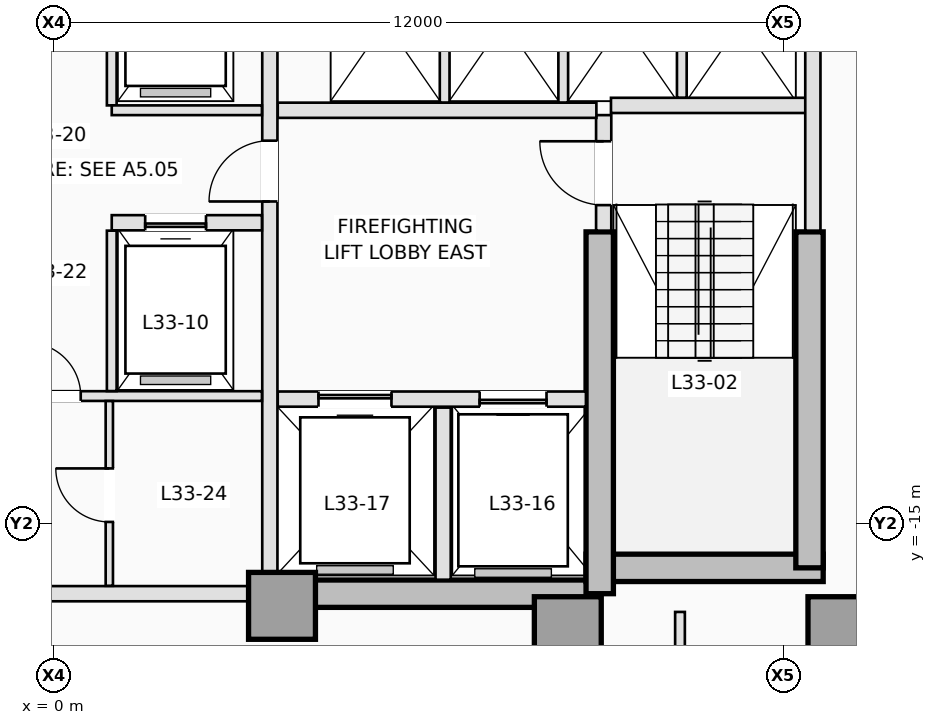
"""IFC4 building model, lengths in metres.
Left out: names, types, materials, properties, quantities, classifications, styles, units other than length and angle.
Written with IfcOpenShell. Run it as: python <this file> out.ifc"""

import sys

from ifc_helpers import new_model, si_unit, direction, frame, frame_2d, origin, origin_2d, place, context, subcontext, project, spatial, rectangle, extrude, element, fill, save


model = new_model("IFC4")
c1 = context("Model", 3, precision=1e-05, world=origin(), true_north=direction((0.0, 1.0)))
c2 = subcontext(c1, "Body", "Model", "MODEL_VIEW")
j1 = project(units=[si_unit("LENGTHUNIT", "METRE"), si_unit("PLANEANGLEUNIT", "RADIAN")], contexts=[c1])
p1 = place(None, origin())
s1 = spatial("IfcSite", under=j1, at=p1, CompositionType="ELEMENT")
p2 = place(p1, origin())
s2 = spatial("IfcBuilding", under=s1, at=p2, CompositionType="ELEMENT")
p3 = place(p2, frame((0.0, 0.0, 123.0)))
s3 = spatial("IfcBuildingStorey", under=s2, at=p3, CompositionType="ELEMENT", Elevation=123.0)
p4 = place(p3, frame((3.75, -16.15, 0.0), z_axis=(0.0, 0.0, 1.0), x_axis=(1.0, 0.0, 0.0)))
e1 = element("IfcWall", 1, at=p4, inside=s3, PredefinedType="SHEAR", context=c2, shape_type="SweptSolid", body=[
    extrude(rectangle(XDim=5.225, YDim=0.45, at=frame_2d((2.613, 0.0))), origin(), (0.0, 0.0, 1.0), 3.5),
])
p5 = place(p3, frame((8.75, -15.725, 0.0), z_axis=(0.0, 0.0, 1.0), x_axis=(1.0, 0.0, 0.0)))
e2 = element("IfcWall", 2, at=p5, inside=s3, PredefinedType="SHEAR", context=c2, shape_type="SweptSolid", body=[
    extrude(rectangle(XDim=3.9, YDim=0.45, at=frame_2d((1.95, 0.0))), origin(), (0.0, 0.0, 1.0), 3.5),
])
p6 = place(p3, frame((12.425, -15.725, 0.0), z_axis=(0.0, 0.0, 1.0), x_axis=(0.0, 1.0, 0.0)))
e3 = element("IfcWall", 3, at=p6, inside=s3, PredefinedType="SHEAR", context=c2, shape_type="SweptSolid", body=[
    extrude(rectangle(XDim=5.525, YDim=0.45, at=frame_2d((2.763, 0.0))), origin(), (0.0, 0.0, 1.0), 3.5),
])
p7 = place(p3, frame((8.975, -16.15, 0.0), z_axis=(0.0, 0.0, 1.0), x_axis=(0.0, 1.0, 0.0)))
e4 = element("IfcWall", 4, at=p7, inside=s3, PredefinedType="SHEAR", context=c2, shape_type="SweptSolid", body=[
    extrude(rectangle(XDim=5.95, YDim=0.45, at=frame_2d((2.975, 0.0))), origin(), (0.0, 0.0, 1.0), 3.5),
])
for number, where, z_axis, x_axis in (
    (5, (3.75, -16.35, 0.0), (0.0, 0.0, 1.0), (1.0, 0.0, 0.0)),
    (6, (8.45, -16.75, 0.0), (0.0, 0.0, 1.0), (1.0, 0.0, 0.0)),
    (7, (12.95, -16.75, 0.0), (0.0, 0.0, 1.0), (1.0, 0.0, 0.0)),
):
    element("IfcColumn", number, at=place(p3, frame(where, z_axis=z_axis, x_axis=x_axis)), inside=s3, PredefinedType="COLUMN", context=c2, shape_type="SweptSolid", body=[
        extrude(rectangle(XDim=1.1, YDim=1.1, at=origin_2d()), origin(), (0.0, 0.0, 1.0), 3.5),
    ])
p8 = place(p3, frame((9.04, -10.18, 0.0), z_axis=(0.0, 0.0, 1.0), x_axis=(0.0, 1.0, 0.0)))
e8 = element("IfcWall", 8, at=p8, inside=s3, PredefinedType="PARTITIONING", context=c2, shape_type="SweptSolid", body=[
    extrude(rectangle(XDim=1.9, YDim=0.25, at=frame_2d((0.95, 0.0))), origin(), (0.0, 0.0, 1.0), 3.25),
])
p9 = place(p8, frame((0.42, 0.0, 0.0)))
e9 = element("IfcOpeningElement", 9, at=p9, cuts=e8, PredefinedType="OPENING", context=c2, shape_type="SweptSolid", body=[
    extrude(rectangle(XDim=1.05, YDim=2.15, at=frame_2d((0.525, 1.075))), frame((0.0, 0.135, 0.0), z_axis=(0.0, -1.0, 0.0), x_axis=(1.0, 0.0, 0.0)), (0.0, 0.0, 1.0), 0.27),
])
p10 = place(p3, frame((9.16, -8.12, 0.0), z_axis=(0.0, 0.0, 1.0), x_axis=(1.0, 0.0, 0.0)))
e10 = element("IfcWall", 10, at=p10, inside=s3, PredefinedType="PARTITIONING", context=c2, shape_type="SweptSolid", body=[
    extrude(rectangle(XDim=3.22, YDim=0.25, at=frame_2d((1.61, 0.0))), origin(), (0.0, 0.0, 1.0), 3.25),
])
p11 = place(p3, frame((12.48, -10.18, 0.0), z_axis=(0.0, 0.0, 1.0), x_axis=(0.0, 1.0, 0.0)))
e11 = element("IfcWall", 11, at=p11, inside=s3, PredefinedType="PARTITIONING", context=c2, shape_type="SweptSolid", body=[
    extrude(rectangle(XDim=4.828, YDim=0.25, at=frame_2d((2.414, 0.0))), origin(), (0.0, 0.0, 1.0), 3.25),
])
p12 = place(p3, frame((3.68, -12.95, 0.0), z_axis=(0.0, 0.0, 1.0), x_axis=(1.0, 0.0, 0.0)))
e12 = element("IfcWall", 12, at=p12, inside=s3, PredefinedType="PARTITIONING", context=c2, shape_type="SweptSolid", body=[
    extrude(rectangle(XDim=5.068, YDim=0.25, at=frame_2d((2.534, 0.0))), origin(), (0.0, 0.0, 1.0), 3.25),
])
p13 = place(p12, frame((3.32, 0.0, 0.0)))
e13 = element("IfcOpeningElement", 13, at=p13, cuts=e12, PredefinedType="OPENING", context=c2, shape_type="SweptSolid", body=[
    extrude(rectangle(XDim=1.1, YDim=2.15, at=frame_2d((0.55, 1.075))), frame((0.0, 0.135, 0.0), z_axis=(0.0, -1.0, 0.0), x_axis=(1.0, 0.0, 0.0)), (0.0, 0.0, 1.0), 0.27),
])
p14 = place(p12, frame((0.67, 0.0, 0.0)))
e14 = element("IfcOpeningElement", 14, at=p14, cuts=e12, PredefinedType="OPENING", context=c2, shape_type="SweptSolid", body=[
    extrude(rectangle(XDim=1.2, YDim=2.15, at=frame_2d((0.6, 1.075))), frame((0.0, 0.135, 0.0), z_axis=(0.0, -1.0, 0.0), x_axis=(1.0, 0.0, 0.0)), (0.0, 0.0, 1.0), 0.27),
])
p15 = place(p3, frame((6.4, -15.92, 0.0), z_axis=(0.0, 0.0, 1.0), x_axis=(0.0, 1.0, 0.0)))
e15 = element("IfcWall", 15, at=p15, inside=s3, PredefinedType="PARTITIONING", context=c2, shape_type="SweptSolid", body=[
    extrude(rectangle(XDim=2.83, YDim=0.25, at=frame_2d((1.415, 0.0))), origin(), (0.0, 0.0, 1.0), 3.25),
])
p16 = place(p3, frame((3.68, -8.2, 0.0), z_axis=(0.0, 0.0, 1.0), x_axis=(1.0, 0.0, 0.0)))
e16 = element("IfcWall", 16, at=p16, inside=s3, PredefinedType="PARTITIONING", context=c2, shape_type="SweptSolid", body=[
    extrude(rectangle(XDim=5.24, YDim=0.25, at=frame_2d((2.62, 0.0))), origin(), (0.0, 0.0, 1.0), 3.25),
])
p17 = place(p3, frame((3.55, -15.798, 0.0), z_axis=(0.0, 0.0, 1.0), x_axis=(0.0, 1.0, 0.0)))
e17 = element("IfcWall", 17, at=p17, inside=s3, PredefinedType="PARTITIONING", context=c2, shape_type="SweptSolid", body=[
    extrude(rectangle(XDim=10.446, YDim=0.25, at=frame_2d((5.223, 0.0))), origin(), (0.0, 0.0, 1.0), 3.25),
])
p18 = place(p17, frame((6.098, 0.0, 0.0)))
e18 = element("IfcOpeningElement", 18, at=p18, cuts=e17, PredefinedType="OPENING", context=c2, shape_type="SweptSolid", body=[
    extrude(rectangle(XDim=1.0, YDim=2.15, at=frame_2d((0.5, 1.075))), frame((0.0, 0.135, 0.0), z_axis=(0.0, -1.0, 0.0), x_axis=(1.0, 0.0, 0.0)), (0.0, 0.0, 1.0), 0.27),
])
for number, where, z_axis, x_axis in (
    (19, (6.425, -8.073, 0.0), (0.0, 0.0, 1.0), (0.0, 1.0, 0.0)),
    (20, (8.375, -8.073, 0.0), (0.0, 0.0, 1.0), (0.0, 1.0, 0.0)),
):
    element("IfcWall", number, at=place(p3, frame(where, z_axis=z_axis, x_axis=x_axis)), inside=s3, PredefinedType="PARTITIONING", context=c2, shape_type="SweptSolid", body=[
        extrude(rectangle(XDim=2.733, YDim=0.16, at=frame_2d((1.366, 0.0))), origin(), (0.0, 0.0, 1.0), 3.25),
    ])
p19 = place(p3, frame((10.325, -7.993, 0.0), z_axis=(0.0, 0.0, 1.0), x_axis=(0.0, 1.0, 0.0)))
e21 = element("IfcWall", 21, at=p19, inside=s3, PredefinedType="PARTITIONING", context=c2, shape_type="SweptSolid", body=[
    extrude(rectangle(XDim=2.653, YDim=0.16, at=frame_2d((1.326, 0.0))), origin(), (0.0, 0.0, 1.0), 3.25),
])
p20 = place(p3, frame((-3.198, -16.15, 0.0), z_axis=(0.0, 0.0, 1.0), x_axis=(1.0, 0.0, 0.0)))
e22 = element("IfcWall", 22, at=p20, inside=s3, PredefinedType="PARTITIONING", context=c2, shape_type="SweptSolid", body=[
    extrude(rectangle(XDim=6.396, YDim=0.25, at=frame_2d((3.198, 0.0))), origin(), (0.0, 0.0, 1.0), 2.3),
])
p21 = place(p3, frame((0.95, -8.12, 0.0), z_axis=(0.0, 0.0, 1.0), x_axis=(0.0, 1.0, 0.0)))
e23 = element("IfcWall", 23, at=p21, inside=s3, PredefinedType="PARTITIONING", context=c2, shape_type="SweptSolid", body=[
    extrude(rectangle(XDim=2.78, YDim=0.16, at=frame_2d((1.39, 0.0))), origin(), (0.0, 0.0, 1.0), 3.25),
])
p22 = place(p3, frame((0.95, -8.2, 0.0), z_axis=(0.0, 0.0, 1.0), x_axis=(1.0, 0.0, 0.0)))
e24 = element("IfcWall", 24, at=p22, inside=s3, PredefinedType="PARTITIONING", context=c2, shape_type="SweptSolid", body=[
    extrude(rectangle(XDim=2.47, YDim=0.16, at=frame_2d((1.235, 0.0))), origin(), (0.0, 0.0, 1.0), 3.25),
])
p23 = place(p3, frame((0.95, -10.05, 0.0), z_axis=(0.0, 0.0, 1.0), x_axis=(1.0, 0.0, 0.0)))
e25 = element("IfcWall", 25, at=p23, inside=s3, PredefinedType="PARTITIONING", context=c2, shape_type="SweptSolid", body=[
    extrude(rectangle(XDim=2.47, YDim=0.25, at=frame_2d((1.235, 0.0))), origin(), (0.0, 0.0, 1.0), 3.25),
])
p24 = place(p23, frame((0.55, 0.0, 0.0)))
e26 = element("IfcOpeningElement", 26, at=p24, cuts=e25, PredefinedType="OPENING", context=c2, shape_type="SweptSolid", body=[
    extrude(rectangle(XDim=1.0, YDim=2.15, at=frame_2d((0.5, 1.075))), frame((0.0, 0.135, 0.0), z_axis=(0.0, -1.0, 0.0), x_axis=(1.0, 0.0, 0.0)), (0.0, 0.0, 1.0), 0.27),
])
p25 = place(p3, frame((-3.42, -12.9, 0.0), z_axis=(0.0, 0.0, 1.0), x_axis=(1.0, 0.0, 0.0)))
e27 = element("IfcWall", 27, at=p25, inside=s3, PredefinedType="PARTITIONING", context=c2, shape_type="SweptSolid", body=[
    extrude(rectangle(XDim=6.84, YDim=0.16, at=frame_2d((3.42, 0.0))), origin(), (0.0, 0.0, 1.0), 3.25),
])
p26 = place(p25, frame((2.98, 0.0, 0.0)))
e28 = element("IfcOpeningElement", 28, at=p26, cuts=e27, PredefinedType="OPENING", context=c2, shape_type="SweptSolid", body=[
    extrude(rectangle(XDim=0.88, YDim=2.12, at=frame_2d((0.44, 1.06))), frame((0.0, 0.09, 0.0), z_axis=(0.0, -1.0, 0.0), x_axis=(1.0, 0.0, 0.0)), (0.0, 0.0, 1.0), 0.18),
])
p27 = place(p3, frame((0.95, -12.818, 0.0), z_axis=(0.0, 0.0, 1.0), x_axis=(0.0, 1.0, 0.0)))
e29 = element("IfcWall", 29, at=p27, inside=s3, PredefinedType="PARTITIONING", context=c2, shape_type="SweptSolid", body=[
    extrude(rectangle(XDim=2.638, YDim=0.16, at=frame_2d((1.319, 0.0))), origin(), (0.0, 0.0, 1.0), 3.25),
])
p28 = place(p3, frame((0.91, -16.02, 0.0), z_axis=(0.0, 0.0, 1.0), x_axis=(0.0, 1.0, 0.0)))
e30 = element("IfcWall", 30, at=p28, inside=s3, PredefinedType="PARTITIONING", context=c2, shape_type="SweptSolid", body=[
    extrude(rectangle(XDim=3.038, YDim=0.12, at=frame_2d((1.519, 0.0))), origin(), (0.0, 0.0, 1.0), 3.25),
])
p29 = place(p28, frame((1.05, 0.0, 0.0)))
e31 = element("IfcOpeningElement", 31, at=p29, cuts=e30, PredefinedType="OPENING", context=c2, shape_type="SweptSolid", body=[
    extrude(rectangle(XDim=0.88, YDim=2.12, at=frame_2d((0.44, 1.06))), frame((0.0, 0.07, 0.0), z_axis=(0.0, -1.0, 0.0), x_axis=(1.0, 0.0, 0.0)), (0.0, 0.0, 1.0), 0.14),
])
p30 = place(p3, frame((10.295, -19.83, 0.0), z_axis=(0.0, 0.0, 1.0), x_axis=(0.0, 1.0, 0.0)))
e32 = element("IfcWall", 32, at=p30, inside=s3, PredefinedType="PARTITIONING", context=c2, shape_type="SweptSolid", body=[
    extrude(rectangle(XDim=3.38, YDim=0.16, at=frame_2d((1.69, 0.0))), origin(), (0.0, 0.0, 1.0), 3.25),
])
p31 = place(p13, origin())
e33 = element("IfcDoor", 33, at=p31, inside=s3, OperationType="SLIDING_TO_RIGHT", PredefinedType="DOOR", context=c2, shape_type="SweptSolid", body=[
    extrude(rectangle(XDim=1.1, YDim=2.15, at=frame_2d((0.55, 1.075))), frame((0.0, 0.025, 0.0), z_axis=(0.0, -1.0, 0.0), x_axis=(1.0, 0.0, 0.0)), (0.0, 0.0, 1.0), 0.05),
])
fill(e13, e33)
p32 = place(p14, origin())
e34 = element("IfcDoor", 34, at=p32, inside=s3, OperationType="SLIDING_TO_LEFT", PredefinedType="DOOR", context=c2, shape_type="SweptSolid", body=[
    extrude(rectangle(XDim=1.2, YDim=2.15, at=frame_2d((0.6, 1.075))), frame((0.0, 0.025, 0.0), z_axis=(0.0, -1.0, 0.0), x_axis=(1.0, 0.0, 0.0)), (0.0, 0.0, 1.0), 0.05),
])
fill(e14, e34)
p33 = place(p24, origin())
e35 = element("IfcDoor", 35, at=p33, inside=s3, OperationType="SLIDING_TO_RIGHT", PredefinedType="DOOR", context=c2, shape_type="SweptSolid", body=[
    extrude(rectangle(XDim=1.0, YDim=2.15, at=frame_2d((0.5, 1.075))), frame((0.0, 0.025, 0.0), z_axis=(0.0, -1.0, 0.0), x_axis=(1.0, 0.0, 0.0)), (0.0, 0.0, 1.0), 0.05),
])
fill(e26, e35)
p34 = place(p9, origin())
e36 = element("IfcDoor", 36, at=p34, inside=s3, OperationType="SINGLE_SWING_RIGHT", PredefinedType="DOOR", context=c2, shape_type="SweptSolid", body=[
    extrude(rectangle(XDim=1.05, YDim=2.15, at=frame_2d((0.525, 1.075))), frame((0.0, 0.025, 0.0), z_axis=(0.0, -1.0, 0.0), x_axis=(1.0, 0.0, 0.0)), (0.0, 0.0, 1.0), 0.05),
])
fill(e9, e36)
p35 = place(p18, origin())
e37 = element("IfcDoor", 37, at=p35, inside=s3, OperationType="SINGLE_SWING_LEFT", PredefinedType="DOOR", context=c2, shape_type="SweptSolid", body=[
    extrude(rectangle(XDim=1.0, YDim=2.15, at=frame_2d((0.5, 1.075))), frame((0.0, 0.025, 0.0), z_axis=(0.0, -1.0, 0.0), x_axis=(1.0, 0.0, 0.0)), (0.0, 0.0, 1.0), 0.05),
])
fill(e18, e37)
p36 = place(p26, origin())
e38 = element("IfcDoor", 38, at=p36, inside=s3, OperationType="SINGLE_SWING_LEFT", PredefinedType="DOOR", context=c2, shape_type="SweptSolid", body=[
    extrude(rectangle(XDim=0.88, YDim=2.12, at=frame_2d((0.44, 1.06))), frame((0.0, 0.025, 0.0), z_axis=(0.0, -1.0, 0.0), x_axis=(1.0, 0.0, 0.0)), (0.0, 0.0, 1.0), 0.05),
])
fill(e28, e38)
p37 = place(p29, origin())
e39 = element("IfcDoor", 39, at=p37, inside=s3, OperationType="SINGLE_SWING_RIGHT", PredefinedType="DOOR", context=c2, shape_type="SweptSolid", body=[
    extrude(rectangle(XDim=0.88, YDim=2.12, at=frame_2d((0.44, 1.06))), frame((0.0, 0.025, 0.0), z_axis=(0.0, -1.0, 0.0), x_axis=(1.0, 0.0, 0.0)), (0.0, 0.0, 1.0), 0.05),
])
fill(e31, e39)
save(model, sys.argv[1])
